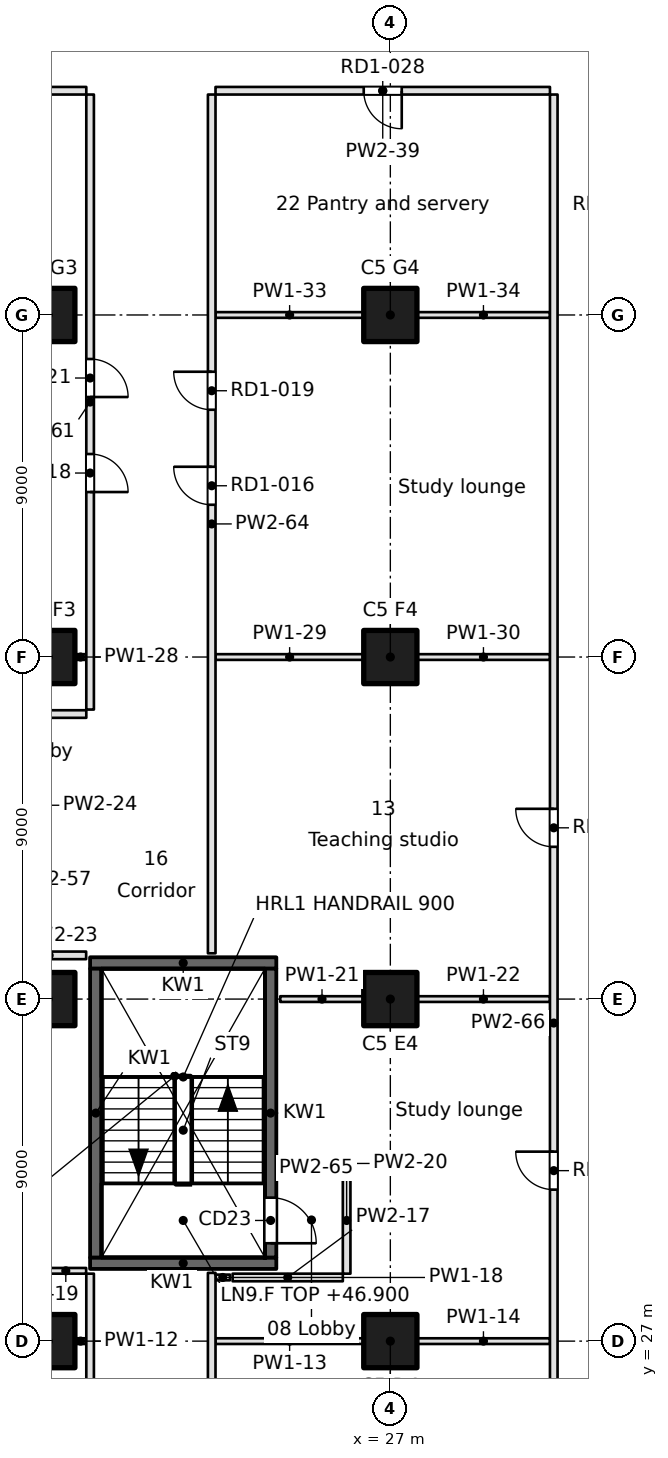
"""IFC4 building model, lengths in metres.
Left out: names, types, materials, properties, quantities, classifications, styles, units other than length and angle.
Written with IfcOpenShell. Run it as: python <this file> out.ifc"""

import sys

from ifc_helpers import new_model, si_unit, direction, frame, frame_2d, origin, origin_2d, place, context, subcontext, project, spatial, rectangle, extrude, element, fill, save


model = new_model("IFC4")
c1 = context("Model", 3, precision=1e-05, world=origin(), true_north=direction((0.0, 1.0)))
c2 = subcontext(c1, "Body", "Model", "MODEL_VIEW")
j1 = project(units=[si_unit("LENGTHUNIT", "METRE"), si_unit("PLANEANGLEUNIT", "RADIAN")], contexts=[c1])
p1 = place(None, origin())
s1 = spatial("IfcSite", under=j1, at=p1, CompositionType="ELEMENT")
p2 = place(p1, origin())
s2 = spatial("IfcBuilding", under=s1, at=p2, CompositionType="ELEMENT")
p3 = place(p2, frame((0.0, 0.0, 46.9)))
s3 = spatial("IfcBuildingStorey", under=s2, at=p3, CompositionType="ELEMENT", Elevation=46.9)
for number, where, z_axis, x_axis in (
    (1, (18.0, 27.0, 0.0), (0.0, 0.0, 1.0), (1.0, 0.0, 0.0)),
    (2, (18.0, 36.0, 0.0), (0.0, 0.0, 1.0), (1.0, 0.0, 0.0)),
    (3, (18.0, 45.0, 0.0), (0.0, 0.0, 1.0), (1.0, 0.0, 0.0)),
    (4, (18.0, 54.0, 0.0), (0.0, 0.0, 1.0), (1.0, 0.0, 0.0)),
    (5, (27.0, 27.0, 0.0), (0.0, 0.0, 1.0), (1.0, 0.0, 0.0)),
    (6, (27.0, 36.0, 0.0), (0.0, 0.0, 1.0), (1.0, 0.0, 0.0)),
    (7, (27.0, 45.0, 0.0), (0.0, 0.0, 1.0), (1.0, 0.0, 0.0)),
    (8, (27.0, 54.0, 0.0), (0.0, 0.0, 1.0), (1.0, 0.0, 0.0)),
):
    element("IfcColumn", number, at=place(p3, frame(where, z_axis=z_axis, x_axis=x_axis)), inside=s3, PredefinedType="COLUMN", context=c2, shape_type="SweptSolid", body=[
        extrude(rectangle(XDim=1.4, YDim=1.4, at=origin_2d()), origin(), (0.0, 0.0, 1.0), 3.7),
    ])
for number, where, z_axis, x_axis in (
    (9, (19.1, 29.05, -0.4), (0.0, 0.0, 1.0), (1.0, 0.0, 0.0)),
    (10, (19.1, 36.95, -0.4), (0.0, 0.0, 1.0), (1.0, 0.0, 0.0)),
):
    element("IfcWall", number, at=place(p3, frame(where, z_axis=z_axis, x_axis=x_axis)), inside=s3, PredefinedType="SOLIDWALL", context=c2, shape_type="SweptSolid", body=[
        extrude(rectangle(XDim=4.9, YDim=0.3, at=frame_2d((2.45, 0.0))), origin(), (0.0, 0.0, 1.0), 3.7),
    ])
p4 = place(p3, frame((19.25, 29.2, -0.4), z_axis=(0.0, 0.0, 1.0), x_axis=(0.0, 1.0, 0.0)))
e11 = element("IfcWall", 11, at=p4, inside=s3, PredefinedType="SOLIDWALL", context=c2, shape_type="SweptSolid", body=[
    extrude(rectangle(XDim=7.6, YDim=0.3, at=frame_2d((3.8, 0.0))), origin(), (0.0, 0.0, 1.0), 3.7),
])
p5 = place(p3, frame((23.85, 29.2, -0.4), z_axis=(0.0, 0.0, 1.0), x_axis=(0.0, 1.0, 0.0)))
e12 = element("IfcWall", 12, at=p5, inside=s3, PredefinedType="SOLIDWALL", context=c2, shape_type="SweptSolid", body=[
    extrude(rectangle(XDim=7.6, YDim=0.3, at=frame_2d((3.8, 0.0))), origin(), (0.0, 0.0, 1.0), 3.7),
])
p6 = place(p5, frame((0.375, 0.0, 0.4)))
e13 = element("IfcOpeningElement", 13, at=p6, cuts=e12, PredefinedType="OPENING", context=c2, shape_type="SweptSolid", body=[
    extrude(rectangle(XDim=1.2, YDim=2.1, at=frame_2d((0.6, 1.05))), frame((0.0, 0.15, 0.0), z_axis=(0.0, -1.0, 0.0), x_axis=(1.0, 0.0, 0.0)), (0.0, 0.0, 1.0), 0.3),
])
p7 = place(p3, frame((18.7, 27.0, 0.0), z_axis=(0.0, 0.0, 1.0), x_axis=(1.0, 0.0, 0.0)))
e14 = element("IfcWall", 14, at=p7, inside=s3, PredefinedType="PARTITIONING", context=c2, shape_type="SweptSolid", body=[
    extrude(rectangle(XDim=0.3, YDim=0.15, at=frame_2d((0.15, 0.0))), origin(), (0.0, 0.0, 1.0), 3.3),
])
p8 = place(p3, frame((22.4, 27.0, 0.0), z_axis=(0.0, 0.0, 1.0), x_axis=(1.0, 0.0, 0.0)))
e15 = element("IfcWall", 15, at=p8, inside=s3, PredefinedType="PARTITIONING", context=c2, shape_type="SweptSolid", body=[
    extrude(rectangle(XDim=3.9, YDim=0.15, at=frame_2d((1.95, 0.0))), origin(), (0.0, 0.0, 1.0), 3.3),
])
p9 = place(p3, frame((27.7, 27.0, 0.0), z_axis=(0.0, 0.0, 1.0), x_axis=(1.0, 0.0, 0.0)))
e16 = element("IfcWall", 16, at=p9, inside=s3, PredefinedType="PARTITIONING", context=c2, shape_type="SweptSolid", body=[
    extrude(rectangle(XDim=3.5, YDim=0.15, at=frame_2d((1.75, 0.0))), origin(), (0.0, 0.0, 1.0), 3.3),
])
p10 = place(p3, frame((25.75, 28.675, 0.0), z_axis=(0.0, 0.0, 1.0), x_axis=(-1.0, 0.0, 0.0)))
e17 = element("IfcWall", 17, at=p10, inside=s3, PredefinedType="PARTITIONING", context=c2, shape_type="SweptSolid", body=[
    extrude(rectangle(XDim=2.9, YDim=0.2, at=frame_2d((1.45, 0.0))), origin(), (0.0, 0.0, 1.0), 3.3),
])
p11 = place(p3, frame((22.4, 28.675, 0.0), z_axis=(0.0, 0.0, 1.0), x_axis=(1.0, 0.0, 0.0)))
e18 = element("IfcWall", 18, at=p11, inside=s3, PredefinedType="PARTITIONING", context=c2, shape_type="SweptSolid", body=[
    extrude(rectangle(XDim=0.38, YDim=0.15, at=frame_2d((0.19, 0.0))), origin(), (0.0, 0.0, 1.0), 3.3),
])
p12 = place(p3, frame((17.925, 28.85, 0.0), z_axis=(0.0, 0.0, 1.0), x_axis=(1.0, 0.0, 0.0)))
e19 = element("IfcWall", 19, at=p12, inside=s3, PredefinedType="PARTITIONING", context=c2, shape_type="SweptSolid", body=[
    extrude(rectangle(XDim=1.071, YDim=0.15, at=frame_2d((0.536, 0.0))), origin(), (0.0, 0.0, 1.0), 3.3),
])
p13 = place(p3, frame((24.104, 31.675, 0.0), z_axis=(0.0, 0.0, 1.0), x_axis=(1.0, 0.0, 0.0)))
e20 = element("IfcWall", 20, at=p13, inside=s3, PredefinedType="PARTITIONING", context=c2, shape_type="SweptSolid", body=[
    extrude(rectangle(XDim=1.646, YDim=0.2, at=frame_2d((0.823, 0.0))), origin(), (0.0, 0.0, 1.0), 3.3),
])
p14 = place(p3, frame((24.104, 36.0, 0.0), z_axis=(0.0, 0.0, 1.0), x_axis=(1.0, 0.0, 0.0)))
e21 = element("IfcWall", 21, at=p14, inside=s3, PredefinedType="PARTITIONING", context=c2, shape_type="SweptSolid", body=[
    extrude(rectangle(XDim=2.196, YDim=0.15, at=frame_2d((1.098, 0.0))), origin(), (0.0, 0.0, 1.0), 3.3),
])
p15 = place(p3, frame((27.7, 36.0, 0.0), z_axis=(0.0, 0.0, 1.0), x_axis=(1.0, 0.0, 0.0)))
e22 = element("IfcWall", 22, at=p15, inside=s3, PredefinedType="PARTITIONING", context=c2, shape_type="SweptSolid", body=[
    extrude(rectangle(XDim=3.5, YDim=0.15, at=frame_2d((1.75, 0.0))), origin(), (0.0, 0.0, 1.0), 3.3),
])
p16 = place(p3, frame((18.996, 37.15, 0.0), z_axis=(0.0, 0.0, 1.0), x_axis=(-1.0, 0.0, 0.0)))
e23 = element("IfcWall", 23, at=p16, inside=s3, PredefinedType="PARTITIONING", context=c2, shape_type="SweptSolid", body=[
    extrude(rectangle(XDim=1.946, YDim=0.2, at=frame_2d((0.973, 0.0))), origin(), (0.0, 0.0, 1.0), 3.3),
])
p17 = place(p3, frame((6.1, 43.5, 0.0), z_axis=(0.0, 0.0, 1.0), x_axis=(1.0, 0.0, 0.0)))
e24 = element("IfcWall", 24, at=p17, inside=s3, PredefinedType="PARTITIONING", context=c2, shape_type="SweptSolid", body=[
    extrude(rectangle(XDim=12.9, YDim=0.2, at=frame_2d((6.45, 0.0))), origin(), (0.0, 0.0, 1.0), 3.3),
])
p18 = place(p17, frame((5.55, 0.0, 0.0)))
e25 = element("IfcOpeningElement", 25, at=p18, cuts=e24, PredefinedType="OPENING", context=c2, shape_type="SweptSolid", body=[
    extrude(rectangle(XDim=1.8, YDim=2.1, at=frame_2d((0.9, 1.05))), frame((0.0, 0.1, 0.0), z_axis=(0.0, -1.0, 0.0), x_axis=(1.0, 0.0, 0.0)), (0.0, 0.0, 1.0), 0.2),
])
p19 = place(p3, frame((18.7, 45.0, 0.0), z_axis=(0.0, 0.0, 1.0), x_axis=(1.0, 0.0, 0.0)))
e26 = element("IfcWall", 26, at=p19, inside=s3, PredefinedType="PARTITIONING", context=c2, shape_type="SweptSolid", body=[
    extrude(rectangle(XDim=0.3, YDim=0.15, at=frame_2d((0.15, 0.0))), origin(), (0.0, 0.0, 1.0), 3.3),
])
p20 = place(p3, frame((22.4, 45.0, 0.0), z_axis=(0.0, 0.0, 1.0), x_axis=(1.0, 0.0, 0.0)))
e27 = element("IfcWall", 27, at=p20, inside=s3, PredefinedType="PARTITIONING", context=c2, shape_type="SweptSolid", body=[
    extrude(rectangle(XDim=3.9, YDim=0.15, at=frame_2d((1.95, 0.0))), origin(), (0.0, 0.0, 1.0), 3.3),
])
p21 = place(p3, frame((27.7, 45.0, 0.0), z_axis=(0.0, 0.0, 1.0), x_axis=(1.0, 0.0, 0.0)))
e28 = element("IfcWall", 28, at=p21, inside=s3, PredefinedType="PARTITIONING", context=c2, shape_type="SweptSolid", body=[
    extrude(rectangle(XDim=3.5, YDim=0.15, at=frame_2d((1.75, 0.0))), origin(), (0.0, 0.0, 1.0), 3.3),
])
p22 = place(p3, frame((22.4, 54.0, 0.0), z_axis=(0.0, 0.0, 1.0), x_axis=(1.0, 0.0, 0.0)))
e29 = element("IfcWall", 29, at=p22, inside=s3, PredefinedType="PARTITIONING", context=c2, shape_type="SweptSolid", body=[
    extrude(rectangle(XDim=3.9, YDim=0.15, at=frame_2d((1.95, 0.0))), origin(), (0.0, 0.0, 1.0), 3.3),
])
p23 = place(p3, frame((27.7, 54.0, 0.0), z_axis=(0.0, 0.0, 1.0), x_axis=(1.0, 0.0, 0.0)))
e30 = element("IfcWall", 30, at=p23, inside=s3, PredefinedType="PARTITIONING", context=c2, shape_type="SweptSolid", body=[
    extrude(rectangle(XDim=3.5, YDim=0.15, at=frame_2d((1.75, 0.0))), origin(), (0.0, 0.0, 1.0), 3.3),
])
p24 = place(p3, frame((19.0, 59.9, 0.0), z_axis=(0.0, 0.0, 1.0), x_axis=(-1.0, 0.0, 0.0)))
e31 = element("IfcWall", 31, at=p24, inside=s3, PredefinedType="PARTITIONING", context=c2, shape_type="SweptSolid", body=[
    extrude(rectangle(XDim=10.096, YDim=0.2, at=frame_2d((5.048, 0.0))), origin(), (0.0, 0.0, 1.0), 3.3),
])
p25 = place(p3, frame((31.2, 59.9, 0.0), z_axis=(0.0, 0.0, 1.0), x_axis=(-1.0, 0.0, 0.0)))
e32 = element("IfcWall", 32, at=p25, inside=s3, PredefinedType="PARTITIONING", context=c2, shape_type="SweptSolid", body=[
    extrude(rectangle(XDim=8.8, YDim=0.2, at=frame_2d((4.4, 0.0))), origin(), (0.0, 0.0, 1.0), 3.3),
])
p26 = place(p25, frame((3.9, 0.0, 0.0)))
e33 = element("IfcOpeningElement", 33, at=p26, cuts=e32, PredefinedType="OPENING", context=c2, shape_type="SweptSolid", body=[
    extrude(rectangle(XDim=1.0, YDim=2.1, at=frame_2d((0.5, 1.05))), frame((0.0, 0.1, 0.0), z_axis=(0.0, -1.0, 0.0), x_axis=(1.0, 0.0, 0.0)), (0.0, 0.0, 1.0), 0.2),
])
p27 = place(p3, frame((19.1, 7.679, 0.0), z_axis=(0.0, 0.0, 1.0), x_axis=(0.0, 1.0, 0.0)))
e34 = element("IfcWall", 34, at=p27, inside=s3, PredefinedType="PARTITIONING", context=c2, shape_type="SweptSolid", body=[
    extrude(rectangle(XDim=21.095, YDim=0.2, at=frame_2d((10.548, 0.0))), origin(), (0.0, 0.0, 1.0), 3.3),
])
p28 = place(p27, frame((4.648, 0.0, 0.0)))
e35 = element("IfcOpeningElement", 35, at=p28, cuts=e34, PredefinedType="OPENING", context=c2, shape_type="SweptSolid", body=[
    extrude(rectangle(XDim=1.0, YDim=2.1, at=frame_2d((0.5, 1.05))), frame((0.0, 0.1, 0.0), z_axis=(0.0, -1.0, 0.0), x_axis=(1.0, 0.0, 0.0)), (0.0, 0.0, 1.0), 0.2),
])
p29 = place(p27, frame((7.148, 0.0, 0.0)))
e36 = element("IfcOpeningElement", 36, at=p29, cuts=e34, PredefinedType="OPENING", context=c2, shape_type="SweptSolid", body=[
    extrude(rectangle(XDim=1.0, YDim=2.1, at=frame_2d((0.5, 1.05))), frame((0.0, 0.1, 0.0), z_axis=(0.0, -1.0, 0.0), x_axis=(1.0, 0.0, 0.0)), (0.0, 0.0, 1.0), 0.2),
])
p30 = place(p27, frame((14.317, 0.0, 0.0)))
e37 = element("IfcOpeningElement", 37, at=p30, cuts=e34, PredefinedType="OPENING", context=c2, shape_type="SweptSolid", body=[
    extrude(rectangle(XDim=1.0, YDim=2.1, at=frame_2d((0.5, 1.05))), frame((0.0, 0.1, 0.0), z_axis=(0.0, -1.0, 0.0), x_axis=(1.0, 0.0, 0.0)), (0.0, 0.0, 1.0), 0.2),
])
p31 = place(p27, frame((16.817, 0.0, 0.0)))
e38 = element("IfcOpeningElement", 38, at=p31, cuts=e34, PredefinedType="OPENING", context=c2, shape_type="SweptSolid", body=[
    extrude(rectangle(XDim=1.0, YDim=2.1, at=frame_2d((0.5, 1.05))), frame((0.0, 0.1, 0.0), z_axis=(0.0, -1.0, 0.0), x_axis=(1.0, 0.0, 0.0)), (0.0, 0.0, 1.0), 0.2),
])
p32 = place(p3, frame((19.1, 43.618, 0.0), z_axis=(0.0, 0.0, 1.0), x_axis=(0.0, 1.0, 0.0)))
e39 = element("IfcWall", 39, at=p32, inside=s3, PredefinedType="PARTITIONING", context=c2, shape_type="SweptSolid", body=[
    extrude(rectangle(XDim=16.182, YDim=0.2, at=frame_2d((8.091, 0.0))), origin(), (0.0, 0.0, 1.0), 3.3),
])
p33 = place(p32, frame((5.723, 0.0, 0.0)))
e40 = element("IfcOpeningElement", 40, at=p33, cuts=e39, PredefinedType="OPENING", context=c2, shape_type="SweptSolid", body=[
    extrude(rectangle(XDim=1.0, YDim=2.1, at=frame_2d((0.5, 1.05))), frame((0.0, 0.1, 0.0), z_axis=(0.0, -1.0, 0.0), x_axis=(1.0, 0.0, 0.0)), (0.0, 0.0, 1.0), 0.2),
])
p34 = place(p32, frame((8.223, 0.0, 0.0)))
e41 = element("IfcOpeningElement", 41, at=p34, cuts=e39, PredefinedType="OPENING", context=c2, shape_type="SweptSolid", body=[
    extrude(rectangle(XDim=1.0, YDim=2.1, at=frame_2d((0.5, 1.05))), frame((0.0, 0.1, 0.0), z_axis=(0.0, -1.0, 0.0), x_axis=(1.0, 0.0, 0.0)), (0.0, 0.0, 1.0), 0.2),
])
p35 = place(p3, frame((22.3, 28.796, 0.0), z_axis=(0.0, 0.0, 1.0), x_axis=(0.0, -1.0, 0.0)))
e42 = element("IfcWall", 42, at=p35, inside=s3, PredefinedType="PARTITIONING", context=c2, shape_type="SweptSolid", body=[
    extrude(rectangle(XDim=17.798, YDim=0.2, at=frame_2d((8.899, 0.0))), origin(), (0.0, 0.0, 1.0), 3.3),
])
p36 = place(p35, frame((5.767, 0.0, 0.0)))
e43 = element("IfcOpeningElement", 43, at=p36, cuts=e42, PredefinedType="OPENING", context=c2, shape_type="SweptSolid", body=[
    extrude(rectangle(XDim=1.0, YDim=2.1, at=frame_2d((0.5, 1.05))), frame((0.0, 0.1, 0.0), z_axis=(0.0, -1.0, 0.0), x_axis=(1.0, 0.0, 0.0)), (0.0, 0.0, 1.0), 0.2),
])
p37 = place(p3, frame((22.3, 59.8, 0.0), z_axis=(0.0, 0.0, 1.0), x_axis=(0.0, -1.0, 0.0)))
e44 = element("IfcWall", 44, at=p37, inside=s3, PredefinedType="PARTITIONING", context=c2, shape_type="SweptSolid", body=[
    extrude(rectangle(XDim=22.596, YDim=0.2, at=frame_2d((11.298, 0.0))), origin(), (0.0, 0.0, 1.0), 3.3),
])
p38 = place(p37, frame((9.794, 0.0, 0.0)))
e45 = element("IfcOpeningElement", 45, at=p38, cuts=e44, PredefinedType="OPENING", context=c2, shape_type="SweptSolid", body=[
    extrude(rectangle(XDim=1.0, YDim=2.1, at=frame_2d((0.5, 1.05))), frame((0.0, 0.1, 0.0), z_axis=(0.0, -1.0, 0.0), x_axis=(1.0, 0.0, 0.0)), (0.0, 0.0, 1.0), 0.2),
])
p39 = place(p37, frame((7.294, 0.0, 0.0)))
e46 = element("IfcOpeningElement", 46, at=p39, cuts=e44, PredefinedType="OPENING", context=c2, shape_type="SweptSolid", body=[
    extrude(rectangle(XDim=1.0, YDim=2.1, at=frame_2d((0.5, 1.05))), frame((0.0, 0.1, 0.0), z_axis=(0.0, -1.0, 0.0), x_axis=(1.0, 0.0, 0.0)), (0.0, 0.0, 1.0), 0.2),
])
p40 = place(p3, frame((25.85, 31.575, 0.0), z_axis=(0.0, 0.0, 1.0), x_axis=(0.0, -1.0, 0.0)))
e47 = element("IfcWall", 47, at=p40, inside=s3, PredefinedType="PARTITIONING", context=c2, shape_type="SweptSolid", body=[
    extrude(rectangle(XDim=2.8, YDim=0.2, at=frame_2d((1.4, 0.0))), origin(), (0.0, 0.0, 1.0), 3.3),
])
p41 = place(p3, frame((31.3, 10.939, 0.0), z_axis=(0.0, 0.0, 1.0), x_axis=(0.0, 1.0, 0.0)))
e48 = element("IfcWall", 48, at=p41, inside=s3, PredefinedType="PARTITIONING", context=c2, shape_type="SweptSolid", body=[
    extrude(rectangle(XDim=48.861, YDim=0.2, at=frame_2d((24.431, 0.0))), origin(), (0.0, 0.0, 1.0), 3.3),
])
p42 = place(p41, frame((20.047, 0.0, 0.0)))
e49 = element("IfcOpeningElement", 49, at=p42, cuts=e48, PredefinedType="OPENING", context=c2, shape_type="SweptSolid", body=[
    extrude(rectangle(XDim=1.0, YDim=2.1, at=frame_2d((0.5, 1.05))), frame((0.0, 0.1, 0.0), z_axis=(0.0, -1.0, 0.0), x_axis=(1.0, 0.0, 0.0)), (0.0, 0.0, 1.0), 0.2),
])
p43 = place(p41, frame((29.067, 0.0, 0.0)))
e50 = element("IfcOpeningElement", 50, at=p43, cuts=e48, PredefinedType="OPENING", context=c2, shape_type="SweptSolid", body=[
    extrude(rectangle(XDim=1.0, YDim=2.1, at=frame_2d((0.5, 1.05))), frame((0.0, 0.1, 0.0), z_axis=(0.0, -1.0, 0.0), x_axis=(1.0, 0.0, 0.0)), (0.0, 0.0, 1.0), 0.2),
])
p44 = place(p6, frame((1.2, 0.0, 0.0), z_axis=(0.0, 0.0, 1.0), x_axis=(-1.0, 0.0, 0.0)))
e51 = element("IfcDoor", 51, at=p44, inside=s3, OperationType="SINGLE_SWING_RIGHT", PredefinedType="DOOR", context=c2, shape_type="SweptSolid", body=[
    extrude(rectangle(XDim=1.2, YDim=2.1, at=frame_2d((0.6, 1.05))), frame((0.0, 0.025, 0.0), z_axis=(0.0, -1.0, 0.0), x_axis=(1.0, 0.0, 0.0)), (0.0, 0.0, 1.0), 0.05),
])
fill(e13, e51)
p45 = place(p42, origin())
e52 = element("IfcDoor", 52, at=p45, inside=s3, OperationType="SINGLE_SWING_RIGHT", PredefinedType="DOOR", context=c2, shape_type="SweptSolid", body=[
    extrude(rectangle(XDim=1.0, YDim=2.1, at=frame_2d((0.5, 1.05))), frame((0.0, 0.025, 0.0), z_axis=(0.0, -1.0, 0.0), x_axis=(1.0, 0.0, 0.0)), (0.0, 0.0, 1.0), 0.05),
])
fill(e49, e52)
p46 = place(p43, origin())
e53 = element("IfcDoor", 53, at=p46, inside=s3, OperationType="SINGLE_SWING_RIGHT", PredefinedType="DOOR", context=c2, shape_type="SweptSolid", body=[
    extrude(rectangle(XDim=1.0, YDim=2.1, at=frame_2d((0.5, 1.05))), frame((0.0, 0.025, 0.0), z_axis=(0.0, -1.0, 0.0), x_axis=(1.0, 0.0, 0.0)), (0.0, 0.0, 1.0), 0.05),
])
fill(e50, e53)
p47 = place(p38, frame((1.0, 0.0, 0.0), z_axis=(0.0, 0.0, 1.0), x_axis=(-1.0, 0.0, 0.0)))
e54 = element("IfcDoor", 54, at=p47, inside=s3, OperationType="SINGLE_SWING_RIGHT", PredefinedType="DOOR", context=c2, shape_type="SweptSolid", body=[
    extrude(rectangle(XDim=1.0, YDim=2.1, at=frame_2d((0.5, 1.05))), frame((0.0, 0.025, 0.0), z_axis=(0.0, -1.0, 0.0), x_axis=(1.0, 0.0, 0.0)), (0.0, 0.0, 1.0), 0.05),
])
fill(e45, e54)
p48 = place(p33, frame((1.0, 0.0, 0.0), z_axis=(0.0, 0.0, 1.0), x_axis=(-1.0, 0.0, 0.0)))
e55 = element("IfcDoor", 55, at=p48, inside=s3, OperationType="SINGLE_SWING_RIGHT", PredefinedType="DOOR", context=c2, shape_type="SweptSolid", body=[
    extrude(rectangle(XDim=1.0, YDim=2.1, at=frame_2d((0.5, 1.05))), frame((0.0, 0.025, 0.0), z_axis=(0.0, -1.0, 0.0), x_axis=(1.0, 0.0, 0.0)), (0.0, 0.0, 1.0), 0.05),
])
fill(e40, e55)
p49 = place(p39, frame((1.0, 0.0, 0.0), z_axis=(0.0, 0.0, 1.0), x_axis=(-1.0, 0.0, 0.0)))
e56 = element("IfcDoor", 56, at=p49, inside=s3, OperationType="SINGLE_SWING_RIGHT", PredefinedType="DOOR", context=c2, shape_type="SweptSolid", body=[
    extrude(rectangle(XDim=1.0, YDim=2.1, at=frame_2d((0.5, 1.05))), frame((0.0, 0.025, 0.0), z_axis=(0.0, -1.0, 0.0), x_axis=(1.0, 0.0, 0.0)), (0.0, 0.0, 1.0), 0.05),
])
fill(e46, e56)
p50 = place(p34, frame((1.0, 0.0, 0.0), z_axis=(0.0, 0.0, 1.0), x_axis=(-1.0, 0.0, 0.0)))
e57 = element("IfcDoor", 57, at=p50, inside=s3, OperationType="SINGLE_SWING_RIGHT", PredefinedType="DOOR", context=c2, shape_type="SweptSolid", body=[
    extrude(rectangle(XDim=1.0, YDim=2.1, at=frame_2d((0.5, 1.05))), frame((0.0, 0.025, 0.0), z_axis=(0.0, -1.0, 0.0), x_axis=(1.0, 0.0, 0.0)), (0.0, 0.0, 1.0), 0.05),
])
fill(e41, e57)
p51 = place(p26, origin())
e58 = element("IfcDoor", 58, at=p51, inside=s3, OperationType="SINGLE_SWING_LEFT", PredefinedType="DOOR", context=c2, shape_type="SweptSolid", body=[
    extrude(rectangle(XDim=1.0, YDim=2.1, at=frame_2d((0.5, 1.05))), frame((0.0, 0.025, 0.0), z_axis=(0.0, -1.0, 0.0), x_axis=(1.0, 0.0, 0.0)), (0.0, 0.0, 1.0), 0.05),
])
fill(e33, e58)
save(model, sys.argv[1])
